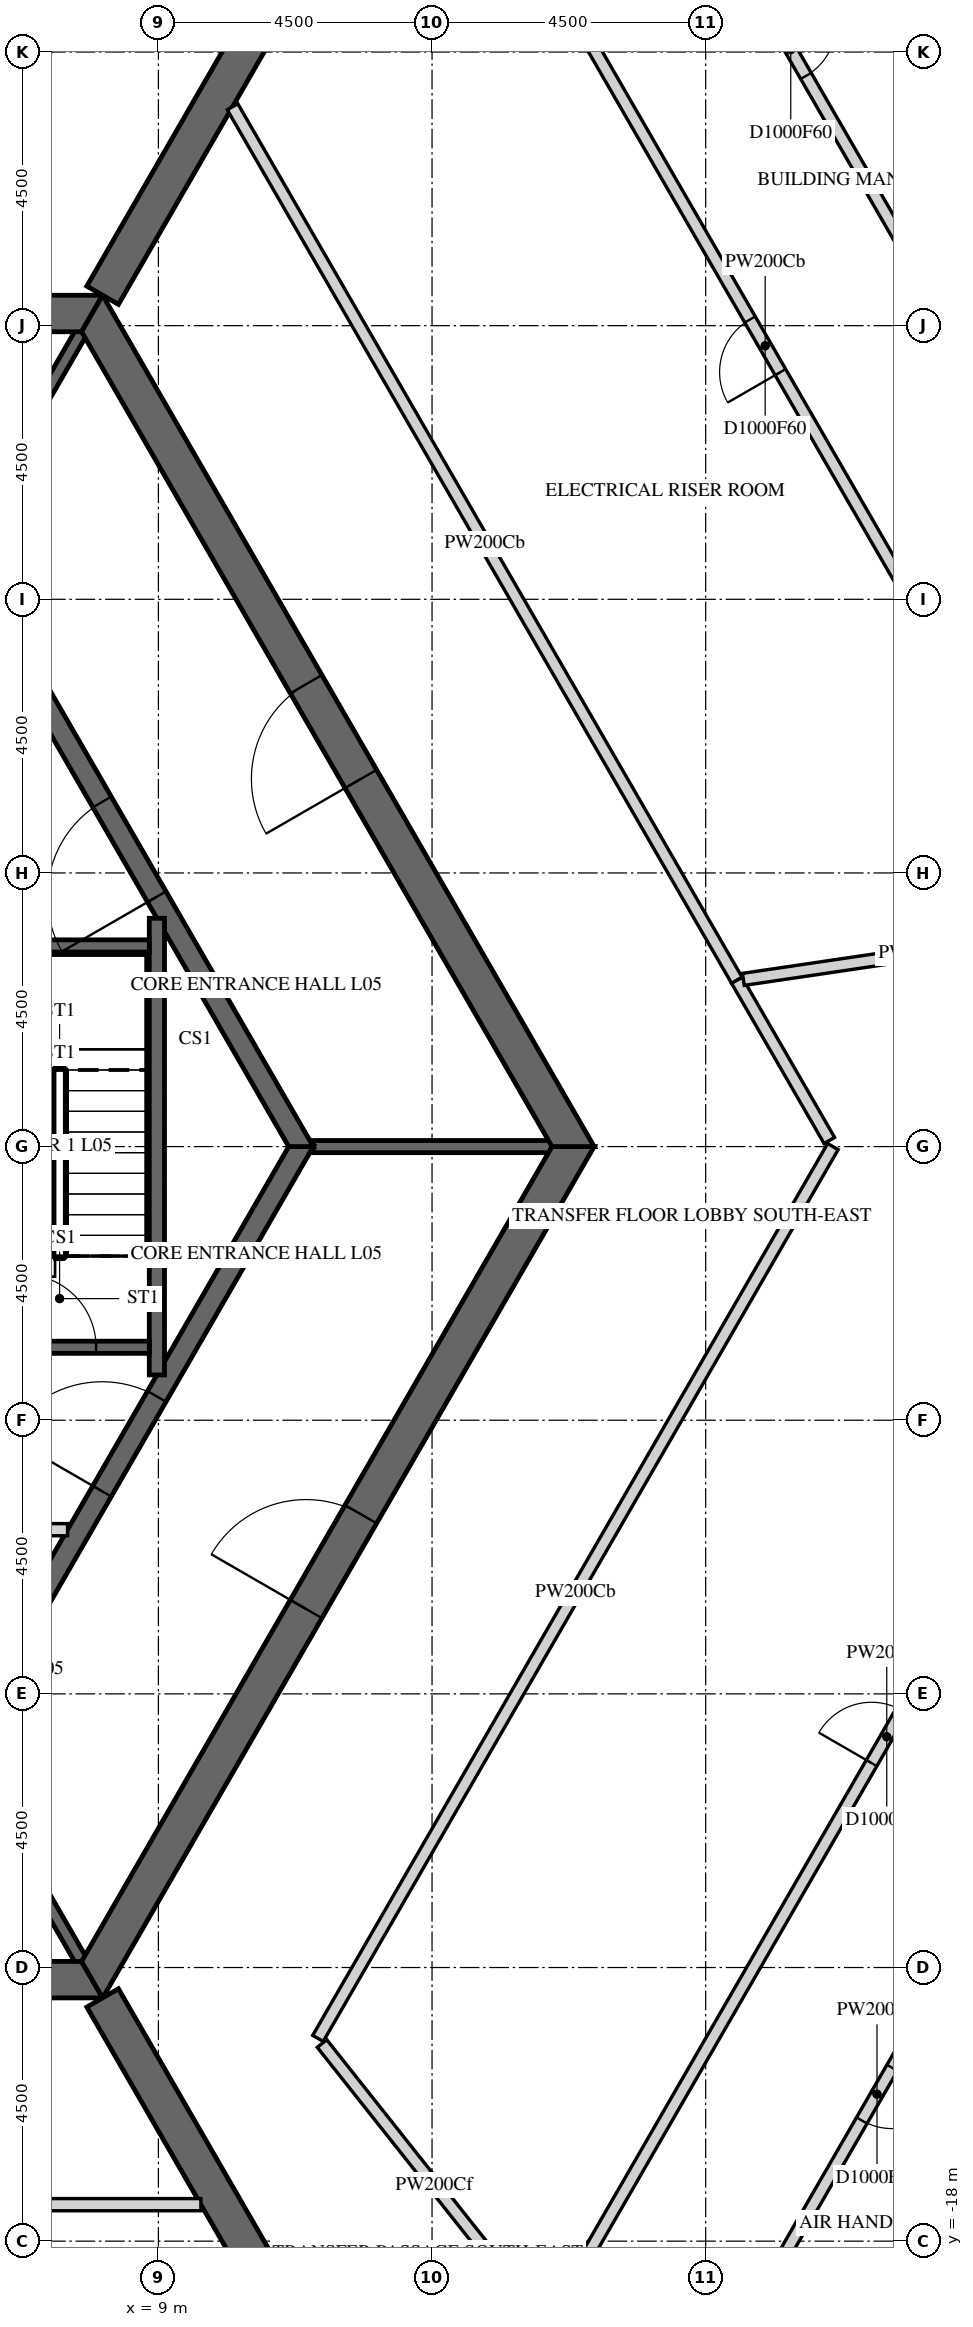
"""IFC4 building model, lengths in metres.
Left out: names, types, materials, properties, quantities, classifications, styles, units other than length and angle.
Written with IfcOpenShell. Run it as: python <this file> out.ifc"""

import sys

from ifc_helpers import new_model, si_unit, direction, frame, frame_2d, origin, place, context, subcontext, project, spatial, polyline, rectangle, outline, extrude, element, fill, save


model = new_model("IFC4")
c1 = context("Model", 3, precision=1e-05, world=origin(), true_north=direction((0.0, 1.0)))
c2 = subcontext(c1, "Body", "Model", "MODEL_VIEW")
j1 = project(units=[si_unit("LENGTHUNIT", "METRE"), si_unit("PLANEANGLEUNIT", "RADIAN")], contexts=[c1])
p1 = place(None, origin())
s1 = spatial("IfcSite", under=j1, at=p1, CompositionType="ELEMENT")
p2 = place(p1, origin())
s2 = spatial("IfcBuilding", under=s1, at=p2, CompositionType="ELEMENT")
p3 = place(p2, frame((0.0, 0.0, 31.5)))
s3 = spatial("IfcBuildingStorey", under=s2, at=p3, CompositionType="ELEMENT", Elevation=31.5)
p4 = place(p3, frame((-7.91, -13.7, -0.3), z_axis=(0.0, 0.0, 1.0), x_axis=(1.0, 0.0, 0.0)))
e1 = element("IfcWall", 1, at=p4, inside=s3, PredefinedType="SHEAR", context=c2, shape_type="SweptSolid", body=[
    extrude(outline(polyline([(-0.173, -0.3), (15.993, -0.3), (15.646, 0.3), (0.173, 0.3), (-0.173, -0.3)])), origin(), (0.0, 0.0, 1.0), 6.15),
])
p5 = place(p4, frame((7.31, 0.0, 0.3)))
e2 = element("IfcOpeningElement", 2, at=p5, cuts=e1, PredefinedType="OPENING", context=c2, shape_type="SweptSolid", body=[
    extrude(rectangle(XDim=1.2, YDim=2.4, at=frame_2d((0.6, 1.2))), frame((0.0, 0.31, 0.0), z_axis=(0.0, -1.0, 0.0), x_axis=(1.0, 0.0, 0.0)), (0.0, 0.0, 1.0), 0.62),
])
p6 = place(p3, frame((7.91, -13.7, -0.3), z_axis=(0.0, 0.0, 1.0), x_axis=(0.499999880136, 0.866025472988, 0.0)))
e3 = element("IfcWall", 3, at=p6, inside=s3, PredefinedType="SHEAR", context=c2, shape_type="SweptSolid", body=[
    extrude(outline(polyline([(-0.173, -0.3), (15.993, -0.3), (15.646, 0.3), (0.173, 0.3), (-0.173, -0.3)])), origin(), (0.0, 0.0, 1.0), 6.15),
])
p7 = place(p6, frame((7.039, 0.0, 0.3)))
e4 = element("IfcOpeningElement", 4, at=p7, cuts=e3, PredefinedType="OPENING", context=c2, shape_type="SweptSolid", body=[
    extrude(rectangle(XDim=1.8, YDim=2.4, at=frame_2d((0.9, 1.2))), frame((0.0, 0.31, 0.0), z_axis=(0.0, -1.0, 0.0), x_axis=(1.0, 0.0, 0.0)), (0.0, 0.0, 1.0), 0.62),
])
p8 = place(p3, frame((15.819, 0.0, -0.3), z_axis=(0.0, 0.0, 1.0), x_axis=(-0.499999880136, 0.866025472988, 0.0)))
e5 = element("IfcWall", 5, at=p8, inside=s3, PredefinedType="SHEAR", context=c2, shape_type="SweptSolid", body=[
    extrude(outline(polyline([(-0.173, -0.3), (15.993, -0.3), (15.646, 0.3), (0.173, 0.3), (-0.173, -0.3)])), origin(), (0.0, 0.0, 1.0), 6.15),
])
p9 = place(p8, frame((6.981, 0.0, 0.3)))
e6 = element("IfcOpeningElement", 6, at=p9, cuts=e5, PredefinedType="OPENING", context=c2, shape_type="SweptSolid", body=[
    extrude(rectangle(XDim=1.8, YDim=2.4, at=frame_2d((0.9, 1.2))), frame((0.0, 0.31, 0.0), z_axis=(0.0, -1.0, 0.0), x_axis=(1.0, 0.0, 0.0)), (0.0, 0.0, 1.0), 0.62),
])
p10 = place(p3, frame((7.91, 13.7, -0.3), z_axis=(0.0, 0.0, 1.0), x_axis=(-1.0, 0.0, 0.0)))
e7 = element("IfcWall", 7, at=p10, inside=s3, PredefinedType="SHEAR", context=c2, shape_type="SweptSolid", body=[
    extrude(outline(polyline([(-0.173, -0.3), (15.993, -0.3), (15.646, 0.3), (0.173, 0.3), (-0.173, -0.3)])), origin(), (0.0, 0.0, 1.0), 6.15),
])
p11 = place(p10, frame((7.31, 0.0, 0.3)))
e8 = element("IfcOpeningElement", 8, at=p11, cuts=e7, PredefinedType="OPENING", context=c2, shape_type="SweptSolid", body=[
    extrude(rectangle(XDim=1.2, YDim=2.4, at=frame_2d((0.6, 1.2))), frame((0.0, 0.31, 0.0), z_axis=(0.0, -1.0, 0.0), x_axis=(1.0, 0.0, 0.0)), (0.0, 0.0, 1.0), 0.62),
])
p12 = place(p3, frame((8.083, 14.0, -0.3), z_axis=(0.0, 0.0, 1.0), x_axis=(0.499997680643, 0.866026742862, 0.0)))
e9 = element("IfcWall", 9, at=p12, inside=s3, PredefinedType="SHEAR", context=c2, shape_type="SweptSolid", body=[
    extrude(rectangle(XDim=16.509, YDim=0.6, at=frame_2d((8.254, 0.0))), origin(), (0.0, 0.0, 1.0), 6.15),
])
p13 = place(p12, frame((7.354, 0.0, 0.3)))
e10 = element("IfcOpeningElement", 10, at=p13, cuts=e9, PredefinedType="OPENING", context=c2, shape_type="SweptSolid", body=[
    extrude(rectangle(XDim=1.8, YDim=2.4, at=frame_2d((0.9, 1.2))), frame((0.0, 0.31, 0.0), z_axis=(0.0, -1.0, 0.0), x_axis=(1.0, 0.0, 0.0)), (0.0, 0.0, 1.0), 0.62),
])
p14 = place(p3, frame((8.083, -14.0, -0.3), z_axis=(0.0, 0.0, 1.0), x_axis=(0.499997680643, -0.866026742862, 0.0)))
e11 = element("IfcWall", 11, at=p14, inside=s3, PredefinedType="SHEAR", context=c2, shape_type="SweptSolid", body=[
    extrude(rectangle(XDim=16.509, YDim=0.6, at=frame_2d((8.254, 0.0))), origin(), (0.0, 0.0, 1.0), 6.15),
])
p15 = place(p14, frame((7.354, 0.0, 0.3)))
e12 = element("IfcOpeningElement", 12, at=p15, cuts=e11, PredefinedType="OPENING", context=c2, shape_type="SweptSolid", body=[
    extrude(rectangle(XDim=1.8, YDim=2.4, at=frame_2d((0.9, 1.2))), frame((0.0, 0.31, 0.0), z_axis=(0.0, -1.0, 0.0), x_axis=(1.0, 0.0, 0.0)), (0.0, 0.0, 1.0), 0.62),
])
p16 = place(p3, frame((5.673, -9.825, -0.3), z_axis=(0.0, 0.0, 1.0), x_axis=(0.499995046907, 0.866028263435, 0.0)))
e13 = element("IfcWall", 13, at=p16, inside=s3, PredefinedType="SHEAR", context=c2, shape_type="SweptSolid", body=[
    extrude(outline(polyline([(-0.101, -0.175), (11.446, -0.175), (11.244, 0.175), (0.101, 0.175), (-0.101, -0.175)])), origin(), (0.0, 0.0, 1.0), 6.15),
])
p17 = place(p16, frame((4.801, 0.0, 0.3)))
e14 = element("IfcOpeningElement", 14, at=p17, cuts=e13, PredefinedType="OPENING", context=c2, shape_type="SweptSolid", body=[
    extrude(rectangle(XDim=1.8, YDim=2.4, at=frame_2d((0.9, 1.2))), frame((0.0, 0.185, 0.0), z_axis=(0.0, -1.0, 0.0), x_axis=(1.0, 0.0, 0.0)), (0.0, 0.0, 1.0), 0.37),
])
p18 = place(p3, frame((11.345, 0.0, -0.3), z_axis=(0.0, 0.0, 1.0), x_axis=(-0.499995046907, 0.866028263435, 0.0)))
e15 = element("IfcWall", 15, at=p18, inside=s3, PredefinedType="SHEAR", context=c2, shape_type="SweptSolid", body=[
    extrude(outline(polyline([(-0.101, -0.175), (11.446, -0.175), (11.244, 0.175), (0.101, 0.175), (-0.101, -0.175)])), origin(), (0.0, 0.0, 1.0), 6.15),
])
p19 = place(p18, frame((4.744, 0.0, 0.3)))
e16 = element("IfcOpeningElement", 16, at=p19, cuts=e15, PredefinedType="OPENING", context=c2, shape_type="SweptSolid", body=[
    extrude(rectangle(XDim=1.8, YDim=2.4, at=frame_2d((0.9, 1.2))), frame((0.0, 0.185, 0.0), z_axis=(0.0, -1.0, 0.0), x_axis=(1.0, 0.0, 0.0)), (0.0, 0.0, 1.0), 0.37),
])
p20 = place(p3, frame((3.7, -6.3, 0.0), z_axis=(0.0, 0.0, 1.0), x_axis=(1.0, 0.0, 0.0)))
e17 = element("IfcWall", 17, at=p20, inside=s3, PredefinedType="PARTITIONING", context=c2, shape_type="SweptSolid", body=[
    extrude(rectangle(XDim=3.806, YDim=0.2, at=frame_2d((1.903, 0.0))), origin(), (0.0, 0.0, 1.0), 5.75),
])
p21 = place(p20, frame((1.453, 0.0, 0.0)))
e18 = element("IfcOpeningElement", 18, at=p21, cuts=e17, PredefinedType="OPENING", context=c2, shape_type="SweptSolid", body=[
    extrude(rectangle(XDim=0.9, YDim=2.1, at=frame_2d((0.45, 1.05))), frame((0.0, 0.11, 0.0), z_axis=(0.0, -1.0, 0.0), x_axis=(1.0, 0.0, 0.0)), (0.0, 0.0, 1.0), 0.22),
])
p22 = place(p3, frame((11.547, 0.0, -0.3), z_axis=(0.0, 0.0, 1.0), x_axis=(1.0, 0.0, 0.0)))
e19 = element("IfcWall", 19, at=p22, inside=s3, PredefinedType="SHEAR", context=c2, shape_type="SweptSolid", body=[
    extrude(rectangle(XDim=3.926, YDim=0.2, at=frame_2d((1.963, 0.0))), origin(), (0.0, 0.0, 1.0), 6.15),
])
for number, where, z_axis, x_axis in (
    (20, (5.773, 10.0, -0.3), (0.0, 0.0, 1.0), (0.5, 0.866, 0.0)),
    (21, (5.773, -10.0, -0.3), (0.0, 0.0, 1.0), (0.5, -0.866, 0.0)),
):
    element("IfcWall", number, at=place(p3, frame(where, z_axis=z_axis, x_axis=x_axis)), inside=s3, PredefinedType="SHEAR", context=c2, shape_type="SweptSolid", body=[
        extrude(rectangle(XDim=3.926, YDim=0.2, at=frame_2d((1.963, 0.0))), origin(), (0.0, 0.0, 1.0), 6.15),
    ])
p23 = place(p3, frame((8.975, -3.755, -0.25), z_axis=(0.0, 0.0, 1.0), x_axis=(0.0, 1.0, 0.0)))
e22 = element("IfcWall", 22, at=p23, inside=s3, PredefinedType="SHEAR", context=c2, shape_type="SweptSolid", body=[
    extrude(rectangle(XDim=7.51, YDim=0.25, at=frame_2d((3.755, 0.0))), origin(), (0.0, 0.0, 1.0), 6.0),
])
p24 = place(p3, frame((5.9, 3.3, -0.25), z_axis=(0.0, 0.0, 1.0), x_axis=(1.0, 0.0, 0.0)))
e23 = element("IfcWall", 23, at=p24, inside=s3, PredefinedType="SHEAR", context=c2, shape_type="SweptSolid", body=[
    extrude(rectangle(XDim=2.95, YDim=0.2, at=frame_2d((1.475, 0.0))), origin(), (0.0, 0.0, 1.0), 6.0),
])
p25 = place(p3, frame((5.9, -3.3, -0.25), z_axis=(0.0, 0.0, 1.0), x_axis=(1.0, 0.0, 0.0)))
e24 = element("IfcWall", 24, at=p25, inside=s3, PredefinedType="SHEAR", context=c2, shape_type="SweptSolid", body=[
    extrude(rectangle(XDim=2.95, YDim=0.2, at=frame_2d((1.475, 0.0))), origin(), (0.0, 0.0, 1.0), 6.0),
])
p26 = place(p25, frame((0.875, 0.0, 0.25)))
e25 = element("IfcOpeningElement", 25, at=p26, cuts=e24, PredefinedType="OPENING", context=c2, shape_type="SweptSolid", body=[
    extrude(rectangle(XDim=1.2, YDim=2.4, at=frame_2d((0.6, 1.2))), frame((0.0, 0.11, 0.0), z_axis=(0.0, -1.0, 0.0), x_axis=(1.0, 0.0, 0.0)), (0.0, 0.0, 1.0), 0.22),
])
p27 = place(p3, frame((-2.468, -17.4, 0.0), z_axis=(0.0, 0.0, 1.0), x_axis=(1.0, 0.0, 0.0)))
e26 = element("IfcWall", 26, at=p27, inside=s3, PredefinedType="PARTITIONING", context=c2, shape_type="SweptSolid", body=[
    extrude(rectangle(XDim=12.167, YDim=0.2, at=frame_2d((6.083, 0.0))), origin(), (0.0, 0.0, 1.0), 5.85),
])
p28 = place(p3, frame((9.074, 22.92, 0.0), z_axis=(0.0, 0.0, 1.0), x_axis=(-0.368102763672, -0.929785112473, 0.0)))
e27 = element("IfcWall", 27, at=p28, inside=s3, PredefinedType="PARTITIONING", context=c2, shape_type="SweptSolid", body=[
    extrude(rectangle(XDim=5.829, YDim=0.2, at=frame_2d((2.915, 0.0))), origin(), (0.0, 0.0, 1.0), 5.088),
])
p29 = place(p3, frame((11.624, -14.666, 0.0), z_axis=(0.0, 0.0, 1.0), x_axis=(0.500026107117, 0.866010330309, 0.0)))
e28 = element("IfcWall", 28, at=p29, inside=s3, PredefinedType="PARTITIONING", context=c2, shape_type="SweptSolid", body=[
    extrude(rectangle(XDim=16.935, YDim=0.2, at=frame_2d((8.468, 0.0))), origin(), (0.0, 0.0, 1.0), 5.85),
])
p30 = place(p3, frame((24.493, 3.617, 0.0), z_axis=(0.0, 0.0, 1.0), x_axis=(-0.49998880049, 0.866031869728, 0.0)))
e29 = element("IfcWall", 29, at=p30, inside=s3, PredefinedType="PARTITIONING", context=c2, shape_type="SweptSolid", body=[
    extrude(rectangle(XDim=22.058, YDim=0.2, at=frame_2d((11.029, 0.0))), origin(), (0.0, 0.0, 1.0), 5.85),
])
p31 = place(p30, frame((10.529, 0.0, 0.0)))
e30 = element("IfcOpeningElement", 30, at=p31, cuts=e29, PredefinedType="OPENING", context=c2, shape_type="SweptSolid", body=[
    extrude(rectangle(XDim=1.0, YDim=2.1, at=frame_2d((0.5, 1.05))), frame((0.0, 0.11, 0.0), z_axis=(0.0, -1.0, 0.0), x_axis=(1.0, 0.0, 0.0)), (0.0, 0.0, 1.0), 0.22),
])
p32 = place(p3, frame((26.555, -5.645, 0.0), z_axis=(0.0, 0.0, 1.0), x_axis=(-0.500000552801, -0.866025084624, 0.0)))
e31 = element("IfcWall", 31, at=p32, inside=s3, PredefinedType="PARTITIONING", context=c2, shape_type="SweptSolid", body=[
    extrude(rectangle(XDim=22.95, YDim=0.2, at=frame_2d((11.475, 0.0))), origin(), (0.0, 0.0, 1.0), 5.85),
])
p33 = place(p32, frame((10.975, 0.0, 0.0)))
e32 = element("IfcOpeningElement", 32, at=p33, cuts=e31, PredefinedType="OPENING", context=c2, shape_type="SweptSolid", body=[
    extrude(rectangle(XDim=1.0, YDim=2.1, at=frame_2d((0.5, 1.05))), frame((0.0, 0.11, 0.0), z_axis=(0.0, -1.0, 0.0), x_axis=(1.0, 0.0, 0.0)), (0.0, 0.0, 1.0), 0.22),
])
p34 = place(p3, frame((15.379, -19.403, 0.0), z_axis=(0.0, 0.0, 1.0), x_axis=(-0.62116837149, 0.783677136492, 0.0)))
e33 = element("IfcWall", 33, at=p34, inside=s3, PredefinedType="PARTITIONING", context=c2, shape_type="SweptSolid", body=[
    extrude(rectangle(XDim=5.937, YDim=0.2, at=frame_2d((2.969, 0.0))), origin(), (0.0, 0.0, 1.0), 5.088),
])
p35 = place(p3, frame((18.513, 2.734, 0.0), z_axis=(0.0, 0.0, 1.0), x_axis=(-0.499982347303, 0.866035595334, 0.0)))
e34 = element("IfcWall", 34, at=p35, inside=s3, PredefinedType="PARTITIONING", context=c2, shape_type="SweptSolid", body=[
    extrude(rectangle(XDim=16.588, YDim=0.2, at=frame_2d((8.294, 0.0))), origin(), (0.0, 0.0, 1.0), 5.85),
])
p36 = place(p3, frame((20.034, 0.1, 0.0), z_axis=(0.0, 0.0, 1.0), x_axis=(-0.500153222552, 0.865936922628, 0.0)))
e35 = element("IfcWall", 35, at=p36, inside=s3, PredefinedType="PARTITIONING", context=c2, shape_type="SweptSolid", body=[
    extrude(rectangle(XDim=3.042, YDim=0.2, at=frame_2d((1.521, 0.0))), origin(), (0.0, 0.0, 1.0), 5.85),
])
p37 = place(p3, frame((15.08, 25.52, 0.0), z_axis=(0.0, 0.0, 1.0), x_axis=(0.500034818431, -0.866005300421, 0.0)))
e36 = element("IfcWall", 36, at=p37, inside=s3, PredefinedType="PARTITIONING", context=c2, shape_type="SweptSolid", body=[
    extrude(rectangle(XDim=17.275, YDim=0.2, at=frame_2d((8.637, 0.0))), origin(), (0.0, 0.0, 1.0), 5.85),
])
p38 = place(p37, frame((8.137, 0.0, 0.0)))
e37 = element("IfcOpeningElement", 37, at=p38, cuts=e36, PredefinedType="OPENING", context=c2, shape_type="SweptSolid", body=[
    extrude(rectangle(XDim=1.0, YDim=2.1, at=frame_2d((0.5, 1.05))), frame((0.0, 0.11, 0.0), z_axis=(0.0, -1.0, 0.0), x_axis=(1.0, 0.0, 0.0)), (0.0, 0.0, 1.0), 0.22),
])
p39 = place(p3, frame((24.387, 3.601, 0.0), z_axis=(0.0, 0.0, 1.0), x_axis=(-0.989274397473, -0.146069047047, 0.0)))
e38 = element("IfcWall", 38, at=p39, inside=s3, PredefinedType="PARTITIONING", context=c2, shape_type="SweptSolid", body=[
    extrude(rectangle(XDim=5.83, YDim=0.2, at=frame_2d((2.915, 0.0))), origin(), (0.0, 0.0, 1.0), 5.85),
])
p40 = place(p3, frame((15.433, -19.31, 0.0), z_axis=(0.0, 0.0, 1.0), x_axis=(0.499986369096, 0.866033273447, 0.0)))
e39 = element("IfcWall", 39, at=p40, inside=s3, PredefinedType="PARTITIONING", context=c2, shape_type="SweptSolid", body=[
    extrude(rectangle(XDim=22.181, YDim=0.2, at=frame_2d((11.091, 0.0))), origin(), (0.0, 0.0, 1.0), 5.85),
])
p41 = place(p40, frame((10.591, 0.0, 0.0)))
e40 = element("IfcOpeningElement", 40, at=p41, cuts=e39, PredefinedType="OPENING", context=c2, shape_type="SweptSolid", body=[
    extrude(rectangle(XDim=1.0, YDim=2.1, at=frame_2d((0.5, 1.05))), frame((0.0, 0.11, 0.0), z_axis=(0.0, -1.0, 0.0), x_axis=(1.0, 0.0, 0.0)), (0.0, 0.0, 1.0), 0.22),
])
p42 = place(p9, origin())
e41 = element("IfcDoor", 41, at=p42, inside=s3, OperationType="DOUBLE_DOOR_SINGLE_SWING", PredefinedType="DOOR", context=c2, shape_type="SweptSolid", body=[
    extrude(rectangle(XDim=1.8, YDim=2.4, at=frame_2d((0.9, 1.2))), frame((0.0, 0.025, 0.0), z_axis=(0.0, -1.0, 0.0), x_axis=(1.0, 0.0, 0.0)), (0.0, 0.0, 1.0), 0.05),
])
fill(e6, e41)
p43 = place(p7, origin())
e42 = element("IfcDoor", 42, at=p43, inside=s3, OperationType="DOUBLE_DOOR_SINGLE_SWING", PredefinedType="DOOR", context=c2, shape_type="SweptSolid", body=[
    extrude(rectangle(XDim=1.8, YDim=2.4, at=frame_2d((0.9, 1.2))), frame((0.0, 0.025, 0.0), z_axis=(0.0, -1.0, 0.0), x_axis=(1.0, 0.0, 0.0)), (0.0, 0.0, 1.0), 0.05),
])
fill(e4, e42)
p44 = place(p19, origin())
e43 = element("IfcDoor", 43, at=p44, inside=s3, OperationType="DOUBLE_DOOR_SINGLE_SWING", PredefinedType="DOOR", context=c2, shape_type="SweptSolid", body=[
    extrude(rectangle(XDim=1.8, YDim=2.4, at=frame_2d((0.9, 1.2))), frame((0.0, 0.025, 0.0), z_axis=(0.0, -1.0, 0.0), x_axis=(1.0, 0.0, 0.0)), (0.0, 0.0, 1.0), 0.05),
])
fill(e16, e43)
p45 = place(p17, origin())
e44 = element("IfcDoor", 44, at=p45, inside=s3, OperationType="DOUBLE_DOOR_SINGLE_SWING", PredefinedType="DOOR", context=c2, shape_type="SweptSolid", body=[
    extrude(rectangle(XDim=1.8, YDim=2.4, at=frame_2d((0.9, 1.2))), frame((0.0, 0.025, 0.0), z_axis=(0.0, -1.0, 0.0), x_axis=(1.0, 0.0, 0.0)), (0.0, 0.0, 1.0), 0.05),
])
fill(e14, e44)
p46 = place(p26, origin())
e45 = element("IfcDoor", 45, at=p46, inside=s3, OperationType="SINGLE_SWING_LEFT", PredefinedType="DOOR", context=c2, shape_type="SweptSolid", body=[
    extrude(rectangle(XDim=1.2, YDim=2.4, at=frame_2d((0.6, 1.2))), frame((0.0, 0.025, 0.0), z_axis=(0.0, -1.0, 0.0), x_axis=(1.0, 0.0, 0.0)), (0.0, 0.0, 1.0), 0.05),
])
fill(e25, e45)
p47 = place(p31, origin())
e46 = element("IfcDoor", 46, at=p47, inside=s3, OperationType="SINGLE_SWING_RIGHT", PredefinedType="DOOR", context=c2, shape_type="SweptSolid", body=[
    extrude(rectangle(XDim=1.0, YDim=2.1, at=frame_2d((0.5, 1.05))), frame((0.0, 0.025, 0.0), z_axis=(0.0, -1.0, 0.0), x_axis=(1.0, 0.0, 0.0)), (0.0, 0.0, 1.0), 0.05),
])
fill(e30, e46)
p48 = place(p33, origin())
e47 = element("IfcDoor", 47, at=p48, inside=s3, OperationType="SINGLE_SWING_RIGHT", PredefinedType="DOOR", context=c2, shape_type="SweptSolid", body=[
    extrude(rectangle(XDim=1.0, YDim=2.1, at=frame_2d((0.5, 1.05))), frame((0.0, 0.025, 0.0), z_axis=(0.0, -1.0, 0.0), x_axis=(1.0, 0.0, 0.0)), (0.0, 0.0, 1.0), 0.05),
])
fill(e32, e47)
p49 = place(p38, origin())
e48 = element("IfcDoor", 48, at=p49, inside=s3, OperationType="SINGLE_SWING_LEFT", PredefinedType="DOOR", context=c2, shape_type="SweptSolid", body=[
    extrude(rectangle(XDim=1.0, YDim=2.1, at=frame_2d((0.5, 1.05))), frame((0.0, 0.025, 0.0), z_axis=(0.0, -1.0, 0.0), x_axis=(1.0, 0.0, 0.0)), (0.0, 0.0, 1.0), 0.05),
])
fill(e37, e48)
p50 = place(p41, origin())
e49 = element("IfcDoor", 49, at=p50, inside=s3, OperationType="SINGLE_SWING_RIGHT", PredefinedType="DOOR", context=c2, shape_type="SweptSolid", body=[
    extrude(rectangle(XDim=1.0, YDim=2.1, at=frame_2d((0.5, 1.05))), frame((0.0, 0.025, 0.0), z_axis=(0.0, -1.0, 0.0), x_axis=(1.0, 0.0, 0.0)), (0.0, 0.0, 1.0), 0.05),
])
fill(e40, e49)
save(model, sys.argv[1])
